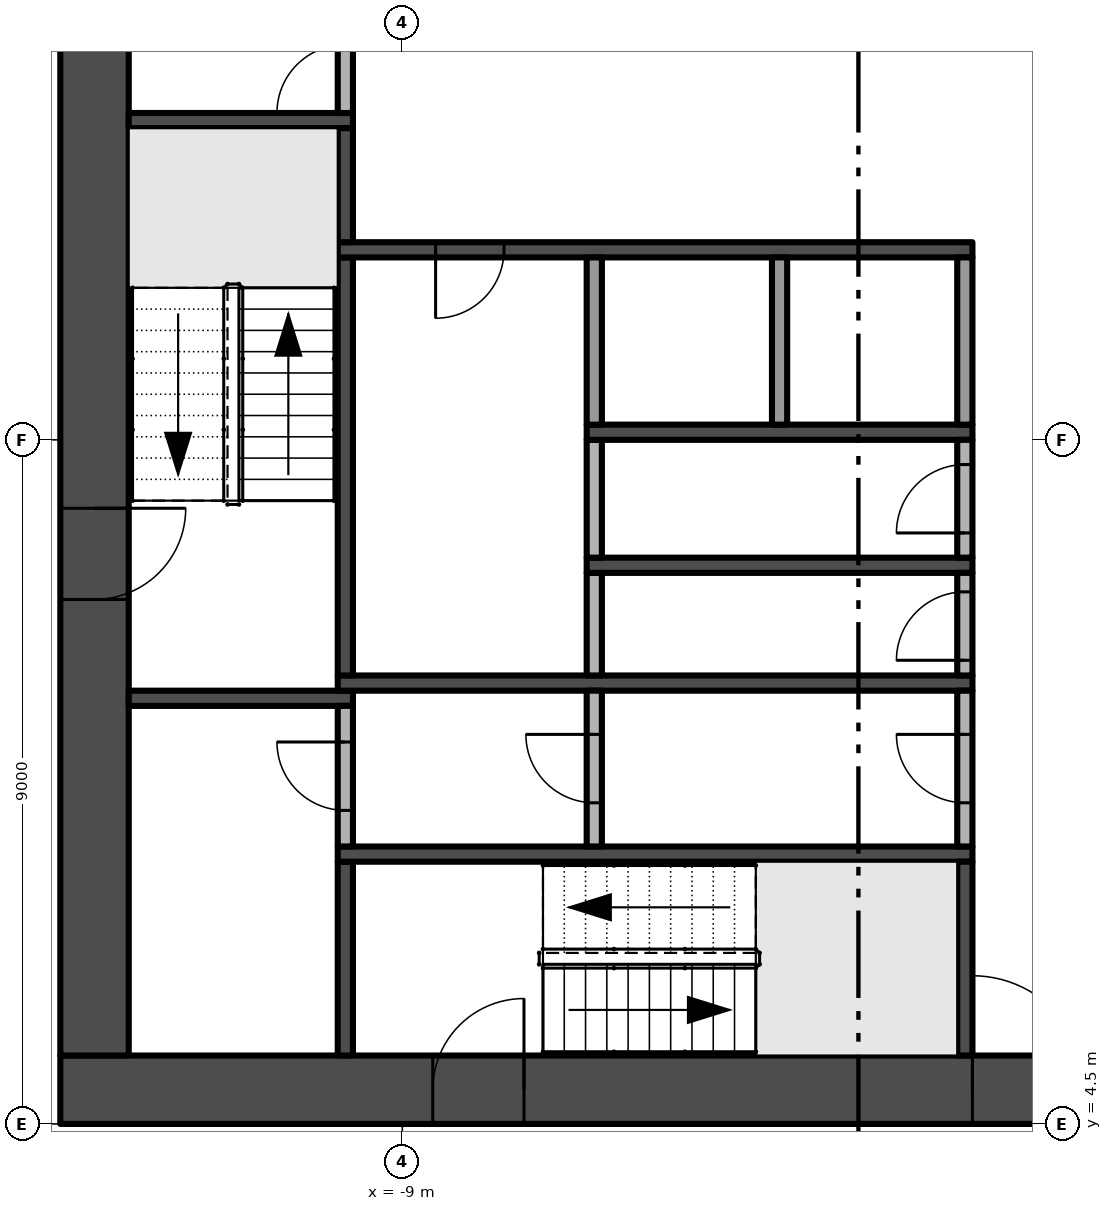
"""IFC4 building model, lengths in metres.
Left out: names, types, materials, properties, quantities, classifications, styles, units other than length and angle.
Written with IfcOpenShell. Run it as: python <this file> out.ifc"""

import sys

from ifc_helpers import new_model, si_unit, direction, frame, frame_2d, origin, place, context, subcontext, project, spatial, rectangle, extrude, element, fill, save


model = new_model("IFC4")
c1 = context("Model", 3, precision=1e-05, world=origin(), true_north=direction((0.0, 1.0)))
c2 = subcontext(c1, "Body", "Model", "MODEL_VIEW")
j1 = project(units=[si_unit("LENGTHUNIT", "METRE"), si_unit("PLANEANGLEUNIT", "RADIAN")], contexts=[c1])
p1 = place(None, origin())
s1 = spatial("IfcSite", under=j1, at=p1, CompositionType="ELEMENT")
p2 = place(p1, origin())
s2 = spatial("IfcBuilding", under=s1, at=p2, CompositionType="ELEMENT")
p3 = place(p2, frame((0.0, 0.0, 96.0)))
s3 = spatial("IfcBuildingStorey", under=s2, at=p3, CompositionType="ELEMENT", Elevation=96.0)
p4 = place(p3, frame((-13.5, 4.95, -0.3), z_axis=(0.0, 0.0, 1.0), x_axis=(1.0, 0.0, 0.0)))
e1 = element("IfcWall", 1, at=p4, inside=s3, PredefinedType="SHEAR", context=c2, shape_type="SweptSolid", body=[
    extrude(rectangle(XDim=27.0, YDim=0.9, at=frame_2d((13.5, 0.0))), origin(), (0.0, 0.0, 1.0), 3.8),
])
p5 = place(p4, frame((12.0, 0.0, 0.3)))
e2 = element("IfcOpeningElement", 2, at=p5, cuts=e1, PredefinedType="OPENING", context=c2, shape_type="SweptSolid", body=[
    extrude(rectangle(XDim=3.0, YDim=2.4, at=frame_2d((1.5, 1.2))), frame((0.0, 0.46, 0.0), z_axis=(0.0, -1.0, 0.0), x_axis=(1.0, 0.0, 0.0)), (0.0, 0.0, 1.0), 0.92),
])
p6 = place(p4, frame((4.9, 0.0, 0.3)))
e3 = element("IfcOpeningElement", 3, at=p6, cuts=e1, PredefinedType="OPENING", context=c2, shape_type="SweptSolid", body=[
    extrude(rectangle(XDim=1.2, YDim=2.2, at=frame_2d((0.6, 1.1))), frame((0.0, 0.46, 0.0), z_axis=(0.0, -1.0, 0.0), x_axis=(1.0, 0.0, 0.0)), (0.0, 0.0, 1.0), 0.92),
])
p7 = place(p4, frame((20.75, 0.0, 0.3)))
e4 = element("IfcOpeningElement", 4, at=p7, cuts=e1, PredefinedType="OPENING", context=c2, shape_type="SweptSolid", body=[
    extrude(rectangle(XDim=1.5, YDim=2.2, at=frame_2d((0.75, 1.1))), frame((0.0, 0.46, 0.0), z_axis=(0.0, -1.0, 0.0), x_axis=(1.0, 0.0, 0.0)), (0.0, 0.0, 1.0), 0.92),
])
p8 = place(p4, frame((17.4, 0.0, 0.3)))
e5 = element("IfcOpeningElement", 5, at=p8, cuts=e1, PredefinedType="OPENING", context=c2, shape_type="SweptSolid", body=[
    extrude(rectangle(XDim=1.2, YDim=2.2, at=frame_2d((0.6, 1.1))), frame((0.0, 0.46, 0.0), z_axis=(0.0, -1.0, 0.0), x_axis=(1.0, 0.0, 0.0)), (0.0, 0.0, 1.0), 0.92),
])
p9 = place(p3, frame((-13.05, 21.6, -0.3), z_axis=(0.0, 0.0, 1.0), x_axis=(0.0, -1.0, 0.0)))
e6 = element("IfcWall", 6, at=p9, inside=s3, PredefinedType="SHEAR", context=c2, shape_type="SweptSolid", body=[
    extrude(rectangle(XDim=16.2, YDim=0.9, at=frame_2d((8.1, 0.0))), origin(), (0.0, 0.0, 1.0), 3.8),
])
p10 = place(p9, frame((9.0, 0.0, 0.3)))
e7 = element("IfcOpeningElement", 7, at=p10, cuts=e6, PredefinedType="OPENING", context=c2, shape_type="SweptSolid", body=[
    extrude(rectangle(XDim=1.2, YDim=2.2, at=frame_2d((0.6, 1.1))), frame((0.0, 0.46, 0.0), z_axis=(0.0, -1.0, 0.0), x_axis=(1.0, 0.0, 0.0)), (0.0, 0.0, 1.0), 0.92),
])
for number, where, z_axis, x_axis in (
    (8, (-12.6, 10.1, 0.0), (0.0, 0.0, 1.0), (1.0, 0.0, 0.0)),
    (9, (-12.6, 17.7, 0.0), (0.0, 0.0, 1.0), (1.0, 0.0, 0.0)),
):
    element("IfcWall", number, at=place(p3, frame(where, z_axis=z_axis, x_axis=x_axis)), inside=s3, PredefinedType="SHEAR", context=c2, shape_type="SweptSolid", body=[
        extrude(rectangle(XDim=2.95, YDim=0.2, at=frame_2d((1.475, 0.0))), origin(), (0.0, 0.0, 1.0), 3.5),
    ])
p11 = place(p3, frame((-9.75, 5.4, 0.0), z_axis=(0.0, 0.0, 1.0), x_axis=(0.0, 1.0, 0.0)))
e10 = element("IfcWall", 10, at=p11, inside=s3, PredefinedType="SHEAR", context=c2, shape_type="SweptSolid", body=[
    extrude(rectangle(XDim=2.55, YDim=0.2, at=frame_2d((1.275, 0.0))), origin(), (0.0, 0.0, 1.0), 3.5),
])
p12 = place(p3, frame((-9.85, 8.05, 0.0), z_axis=(0.0, 0.0, 1.0), x_axis=(1.0, 0.0, 0.0)))
e11 = element("IfcWall", 11, at=p12, inside=s3, PredefinedType="SHEAR", context=c2, shape_type="SweptSolid", body=[
    extrude(rectangle(XDim=8.35, YDim=0.2, at=frame_2d((4.175, 0.0))), origin(), (0.0, 0.0, 1.0), 3.5),
])
p13 = place(p3, frame((-9.75, 8.15, 0.0), z_axis=(0.0, 0.0, 1.0), x_axis=(0.0, 1.0, 0.0)))
e12 = element("IfcWall", 12, at=p13, inside=s3, PredefinedType="PARTITIONING", context=c2, shape_type="SweptSolid", body=[
    extrude(rectangle(XDim=1.85, YDim=0.2, at=frame_2d((0.925, 0.0))), origin(), (0.0, 0.0, 1.0), 3.5),
])
p14 = place(p13, frame((0.475, 0.0, 0.0)))
e13 = element("IfcOpeningElement", 13, at=p14, cuts=e12, PredefinedType="OPENING", context=c2, shape_type="SweptSolid", body=[
    extrude(rectangle(XDim=0.9, YDim=2.1, at=frame_2d((0.45, 1.05))), frame((0.0, 0.11, 0.0), z_axis=(0.0, -1.0, 0.0), x_axis=(1.0, 0.0, 0.0)), (0.0, 0.0, 1.0), 0.22),
])
p15 = place(p3, frame((-9.85, 10.3, 0.0), z_axis=(0.0, 0.0, 1.0), x_axis=(1.0, 0.0, 0.0)))
e14 = element("IfcWall", 14, at=p15, inside=s3, PredefinedType="SHEAR", context=c2, shape_type="SweptSolid", body=[
    extrude(rectangle(XDim=8.35, YDim=0.2, at=frame_2d((4.175, 0.0))), origin(), (0.0, 0.0, 1.0), 3.5),
])
p16 = place(p3, frame((-9.75, 10.4, 0.0), z_axis=(0.0, 0.0, 1.0), x_axis=(0.0, 1.0, 0.0)))
e15 = element("IfcWall", 15, at=p16, inside=s3, PredefinedType="SHEAR", context=c2, shape_type="SweptSolid", body=[
    extrude(rectangle(XDim=5.5, YDim=0.2, at=frame_2d((2.75, 0.0))), origin(), (0.0, 0.0, 1.0), 3.5),
])
p17 = place(p3, frame((-1.5, 16.0, 0.0), z_axis=(0.0, 0.0, 1.0), x_axis=(-1.0, 0.0, 0.0)))
e16 = element("IfcWall", 16, at=p17, inside=s3, PredefinedType="SHEAR", context=c2, shape_type="SweptSolid", body=[
    extrude(rectangle(XDim=8.35, YDim=0.2, at=frame_2d((4.175, 0.0))), origin(), (0.0, 0.0, 1.0), 3.5),
])
p18 = place(p17, frame((6.162, 0.0, 0.0)))
e17 = element("IfcOpeningElement", 17, at=p18, cuts=e16, PredefinedType="OPENING", context=c2, shape_type="SweptSolid", body=[
    extrude(rectangle(XDim=0.9, YDim=2.1, at=frame_2d((0.45, 1.05))), frame((0.0, 0.11, 0.0), z_axis=(0.0, -1.0, 0.0), x_axis=(1.0, 0.0, 0.0)), (0.0, 0.0, 1.0), 0.22),
])
p19 = place(p3, frame((-9.75, 16.1, 0.0), z_axis=(0.0, 0.0, 1.0), x_axis=(0.0, 1.0, 0.0)))
e18 = element("IfcWall", 18, at=p19, inside=s3, PredefinedType="SHEAR", context=c2, shape_type="SweptSolid", body=[
    extrude(rectangle(XDim=1.5, YDim=0.2, at=frame_2d((0.75, 0.0))), origin(), (0.0, 0.0, 1.0), 3.5),
])
p20 = place(p3, frame((-9.75, 17.8, 0.0), z_axis=(0.0, 0.0, 1.0), x_axis=(0.0, 1.0, 0.0)))
e19 = element("IfcWall", 19, at=p20, inside=s3, PredefinedType="PARTITIONING", context=c2, shape_type="SweptSolid", body=[
    extrude(rectangle(XDim=1.4, YDim=0.2, at=frame_2d((0.7, 0.0))), origin(), (0.0, 0.0, 1.0), 3.5),
])
p21 = place(p20, origin())
e20 = element("IfcOpeningElement", 20, at=p21, cuts=e19, PredefinedType="OPENING", context=c2, shape_type="SweptSolid", body=[
    extrude(rectangle(XDim=0.9, YDim=2.1, at=frame_2d((0.45, 1.05))), frame((0.0, 0.11, 0.0), z_axis=(0.0, -1.0, 0.0), x_axis=(1.0, 0.0, 0.0)), (0.0, 0.0, 1.0), 0.22),
])
p22 = place(p3, frame((-6.475, 8.15, 0.0), z_axis=(0.0, 0.0, 1.0), x_axis=(0.0, 1.0, 0.0)))
e21 = element("IfcWall", 21, at=p22, inside=s3, PredefinedType="PARTITIONING", context=c2, shape_type="SweptSolid", body=[
    extrude(rectangle(XDim=2.05, YDim=0.2, at=frame_2d((1.025, 0.0))), origin(), (0.0, 0.0, 1.0), 3.5),
])
p23 = place(p22, frame((0.575, 0.0, 0.0)))
e22 = element("IfcOpeningElement", 22, at=p23, cuts=e21, PredefinedType="OPENING", context=c2, shape_type="SweptSolid", body=[
    extrude(rectangle(XDim=0.9, YDim=2.1, at=frame_2d((0.45, 1.05))), frame((0.0, 0.11, 0.0), z_axis=(0.0, -1.0, 0.0), x_axis=(1.0, 0.0, 0.0)), (0.0, 0.0, 1.0), 0.22),
])
p24 = place(p3, frame((-6.475, 10.4, 0.0), z_axis=(0.0, 0.0, 1.0), x_axis=(0.0, 1.0, 0.0)))
e23 = element("IfcWall", 23, at=p24, inside=s3, PredefinedType="PARTITIONING", context=c2, shape_type="SweptSolid", body=[
    extrude(rectangle(XDim=1.35, YDim=0.2, at=frame_2d((0.675, 0.0))), origin(), (0.0, 0.0, 1.0), 3.5),
])
p25 = place(p3, frame((-6.575, 11.85, 0.0), z_axis=(0.0, 0.0, 1.0), x_axis=(1.0, 0.0, 0.0)))
e24 = element("IfcWall", 24, at=p25, inside=s3, PredefinedType="SHEAR", context=c2, shape_type="SweptSolid", body=[
    extrude(rectangle(XDim=5.075, YDim=0.2, at=frame_2d((2.538, 0.0))), origin(), (0.0, 0.0, 1.0), 3.5),
])
p26 = place(p3, frame((-6.475, 11.95, 0.0), z_axis=(0.0, 0.0, 1.0), x_axis=(0.0, 1.0, 0.0)))
e25 = element("IfcWall", 25, at=p26, inside=s3, PredefinedType="PARTITIONING", context=c2, shape_type="SweptSolid", body=[
    extrude(rectangle(XDim=1.55, YDim=0.2, at=frame_2d((0.775, 0.0))), origin(), (0.0, 0.0, 1.0), 3.5),
])
p27 = place(p3, frame((-6.575, 13.6, 0.0), z_axis=(0.0, 0.0, 1.0), x_axis=(1.0, 0.0, 0.0)))
e26 = element("IfcWall", 26, at=p27, inside=s3, PredefinedType="SHEAR", context=c2, shape_type="SweptSolid", body=[
    extrude(rectangle(XDim=5.075, YDim=0.2, at=frame_2d((2.538, 0.0))), origin(), (0.0, 0.0, 1.0), 3.5),
])
for number, where, z_axis, x_axis in (
    (27, (-6.475, 13.7, 0.0), (0.0, 0.0, 1.0), (0.0, 1.0, 0.0)),
    (28, (-4.037, 13.7, 0.0), (0.0, 0.0, 1.0), (0.0, 1.0, 0.0)),
):
    element("IfcWall", number, at=place(p3, frame(where, z_axis=z_axis, x_axis=x_axis)), inside=s3, PredefinedType="PARTITIONING", context=c2, shape_type="SweptSolid", body=[
        extrude(rectangle(XDim=2.2, YDim=0.2, at=frame_2d((1.1, 0.0))), origin(), (0.0, 0.0, 1.0), 3.5),
    ])
p28 = place(p3, frame((-1.6, 5.4, 0.0), z_axis=(0.0, 0.0, 1.0), x_axis=(0.0, 1.0, 0.0)))
e29 = element("IfcWall", 29, at=p28, inside=s3, PredefinedType="SHEAR", context=c2, shape_type="SweptSolid", body=[
    extrude(rectangle(XDim=2.55, YDim=0.2, at=frame_2d((1.275, 0.0))), origin(), (0.0, 0.0, 1.0), 3.5),
])
p29 = place(p3, frame((-1.6, 8.15, 0.0), z_axis=(0.0, 0.0, 1.0), x_axis=(0.0, 1.0, 0.0)))
e30 = element("IfcWall", 30, at=p29, inside=s3, PredefinedType="PARTITIONING", context=c2, shape_type="SweptSolid", body=[
    extrude(rectangle(XDim=2.05, YDim=0.2, at=frame_2d((1.025, 0.0))), origin(), (0.0, 0.0, 1.0), 3.5),
])
p30 = place(p29, frame((0.575, 0.0, 0.0)))
e31 = element("IfcOpeningElement", 31, at=p30, cuts=e30, PredefinedType="OPENING", context=c2, shape_type="SweptSolid", body=[
    extrude(rectangle(XDim=0.9, YDim=2.1, at=frame_2d((0.45, 1.05))), frame((0.0, 0.11, 0.0), z_axis=(0.0, -1.0, 0.0), x_axis=(1.0, 0.0, 0.0)), (0.0, 0.0, 1.0), 0.22),
])
p31 = place(p3, frame((-1.6, 10.4, 0.0), z_axis=(0.0, 0.0, 1.0), x_axis=(0.0, 1.0, 0.0)))
e32 = element("IfcWall", 32, at=p31, inside=s3, PredefinedType="PARTITIONING", context=c2, shape_type="SweptSolid", body=[
    extrude(rectangle(XDim=1.35, YDim=0.2, at=frame_2d((0.675, 0.0))), origin(), (0.0, 0.0, 1.0), 3.5),
])
p32 = place(p31, frame((0.2, 0.0, 0.0)))
e33 = element("IfcOpeningElement", 33, at=p32, cuts=e32, PredefinedType="OPENING", context=c2, shape_type="SweptSolid", body=[
    extrude(rectangle(XDim=0.9, YDim=2.1, at=frame_2d((0.45, 1.05))), frame((0.0, 0.11, 0.0), z_axis=(0.0, -1.0, 0.0), x_axis=(1.0, 0.0, 0.0)), (0.0, 0.0, 1.0), 0.22),
])
p33 = place(p3, frame((-1.6, 11.95, 0.0), z_axis=(0.0, 0.0, 1.0), x_axis=(0.0, 1.0, 0.0)))
e34 = element("IfcWall", 34, at=p33, inside=s3, PredefinedType="PARTITIONING", context=c2, shape_type="SweptSolid", body=[
    extrude(rectangle(XDim=1.55, YDim=0.2, at=frame_2d((0.775, 0.0))), origin(), (0.0, 0.0, 1.0), 3.5),
])
p34 = place(p33, frame((0.325, 0.0, 0.0)))
e35 = element("IfcOpeningElement", 35, at=p34, cuts=e34, PredefinedType="OPENING", context=c2, shape_type="SweptSolid", body=[
    extrude(rectangle(XDim=0.9, YDim=2.1, at=frame_2d((0.45, 1.05))), frame((0.0, 0.11, 0.0), z_axis=(0.0, -1.0, 0.0), x_axis=(1.0, 0.0, 0.0)), (0.0, 0.0, 1.0), 0.22),
])
p35 = place(p3, frame((-1.6, 13.7, 0.0), z_axis=(0.0, 0.0, 1.0), x_axis=(0.0, 1.0, 0.0)))
e36 = element("IfcWall", 36, at=p35, inside=s3, PredefinedType="PARTITIONING", context=c2, shape_type="SweptSolid", body=[
    extrude(rectangle(XDim=2.2, YDim=0.2, at=frame_2d((1.1, 0.0))), origin(), (0.0, 0.0, 1.0), 3.5),
])
p36 = place(p5, frame((3.0, 0.0, 0.0), z_axis=(0.0, 0.0, 1.0), x_axis=(-1.0, 0.0, 0.0)))
e37 = element("IfcDoor", 37, at=p36, inside=s3, OperationType="DOUBLE_DOOR_SINGLE_SWING", PredefinedType="DOOR", context=c2, shape_type="SweptSolid", body=[
    extrude(rectangle(XDim=3.0, YDim=2.4, at=frame_2d((1.5, 1.2))), frame((0.0, 0.025, 0.0), z_axis=(0.0, -1.0, 0.0), x_axis=(1.0, 0.0, 0.0)), (0.0, 0.0, 1.0), 0.05),
])
fill(e2, e37)
p37 = place(p10, frame((1.2, 0.0, 0.0), z_axis=(0.0, 0.0, 1.0), x_axis=(-1.0, 0.0, 0.0)))
e38 = element("IfcDoor", 38, at=p37, inside=s3, OperationType="SINGLE_SWING_RIGHT", PredefinedType="DOOR", context=c2, shape_type="SweptSolid", body=[
    extrude(rectangle(XDim=1.2, YDim=2.2, at=frame_2d((0.6, 1.1))), frame((0.0, 0.025, 0.0), z_axis=(0.0, -1.0, 0.0), x_axis=(1.0, 0.0, 0.0)), (0.0, 0.0, 1.0), 0.05),
])
fill(e7, e38)
p38 = place(p6, frame((1.2, 0.0, 0.0), z_axis=(0.0, 0.0, 1.0), x_axis=(-1.0, 0.0, 0.0)))
e39 = element("IfcDoor", 39, at=p38, inside=s3, OperationType="SINGLE_SWING_LEFT", PredefinedType="DOOR", context=c2, shape_type="SweptSolid", body=[
    extrude(rectangle(XDim=1.2, YDim=2.2, at=frame_2d((0.6, 1.1))), frame((0.0, 0.025, 0.0), z_axis=(0.0, -1.0, 0.0), x_axis=(1.0, 0.0, 0.0)), (0.0, 0.0, 1.0), 0.05),
])
fill(e3, e39)
p39 = place(p18, origin())
e40 = element("IfcDoor", 40, at=p39, inside=s3, OperationType="SINGLE_SWING_RIGHT", PredefinedType="DOOR", context=c2, shape_type="SweptSolid", body=[
    extrude(rectangle(XDim=0.9, YDim=2.1, at=frame_2d((0.45, 1.05))), frame((0.0, 0.025, 0.0), z_axis=(0.0, -1.0, 0.0), x_axis=(1.0, 0.0, 0.0)), (0.0, 0.0, 1.0), 0.05),
])
fill(e17, e40)
p40 = place(p30, origin())
e41 = element("IfcDoor", 41, at=p40, inside=s3, OperationType="SINGLE_SWING_RIGHT", PredefinedType="DOOR", context=c2, shape_type="SweptSolid", body=[
    extrude(rectangle(XDim=0.9, YDim=2.1, at=frame_2d((0.45, 1.05))), frame((0.0, 0.025, 0.0), z_axis=(0.0, -1.0, 0.0), x_axis=(1.0, 0.0, 0.0)), (0.0, 0.0, 1.0), 0.05),
])
fill(e31, e41)
p41 = place(p32, origin())
e42 = element("IfcDoor", 42, at=p41, inside=s3, OperationType="SINGLE_SWING_LEFT", PredefinedType="DOOR", context=c2, shape_type="SweptSolid", body=[
    extrude(rectangle(XDim=0.9, YDim=2.1, at=frame_2d((0.45, 1.05))), frame((0.0, 0.025, 0.0), z_axis=(0.0, -1.0, 0.0), x_axis=(1.0, 0.0, 0.0)), (0.0, 0.0, 1.0), 0.05),
])
fill(e33, e42)
p42 = place(p34, origin())
e43 = element("IfcDoor", 43, at=p42, inside=s3, OperationType="SINGLE_SWING_LEFT", PredefinedType="DOOR", context=c2, shape_type="SweptSolid", body=[
    extrude(rectangle(XDim=0.9, YDim=2.1, at=frame_2d((0.45, 1.05))), frame((0.0, 0.025, 0.0), z_axis=(0.0, -1.0, 0.0), x_axis=(1.0, 0.0, 0.0)), (0.0, 0.0, 1.0), 0.05),
])
fill(e35, e43)
p43 = place(p21, origin())
e44 = element("IfcDoor", 44, at=p43, inside=s3, OperationType="SINGLE_SWING_LEFT", PredefinedType="DOOR", context=c2, shape_type="SweptSolid", body=[
    extrude(rectangle(XDim=0.9, YDim=2.1, at=frame_2d((0.45, 1.05))), frame((0.0, 0.025, 0.0), z_axis=(0.0, -1.0, 0.0), x_axis=(1.0, 0.0, 0.0)), (0.0, 0.0, 1.0), 0.05),
])
fill(e20, e44)
p44 = place(p23, origin())
e45 = element("IfcDoor", 45, at=p44, inside=s3, OperationType="SINGLE_SWING_RIGHT", PredefinedType="DOOR", context=c2, shape_type="SweptSolid", body=[
    extrude(rectangle(XDim=0.9, YDim=2.1, at=frame_2d((0.45, 1.05))), frame((0.0, 0.025, 0.0), z_axis=(0.0, -1.0, 0.0), x_axis=(1.0, 0.0, 0.0)), (0.0, 0.0, 1.0), 0.05),
])
fill(e22, e45)
p45 = place(p14, origin())
e46 = element("IfcDoor", 46, at=p45, inside=s3, OperationType="SINGLE_SWING_RIGHT", PredefinedType="DOOR", context=c2, shape_type="SweptSolid", body=[
    extrude(rectangle(XDim=0.9, YDim=2.1, at=frame_2d((0.45, 1.05))), frame((0.0, 0.025, 0.0), z_axis=(0.0, -1.0, 0.0), x_axis=(1.0, 0.0, 0.0)), (0.0, 0.0, 1.0), 0.05),
])
fill(e13, e46)
save(model, sys.argv[1])
